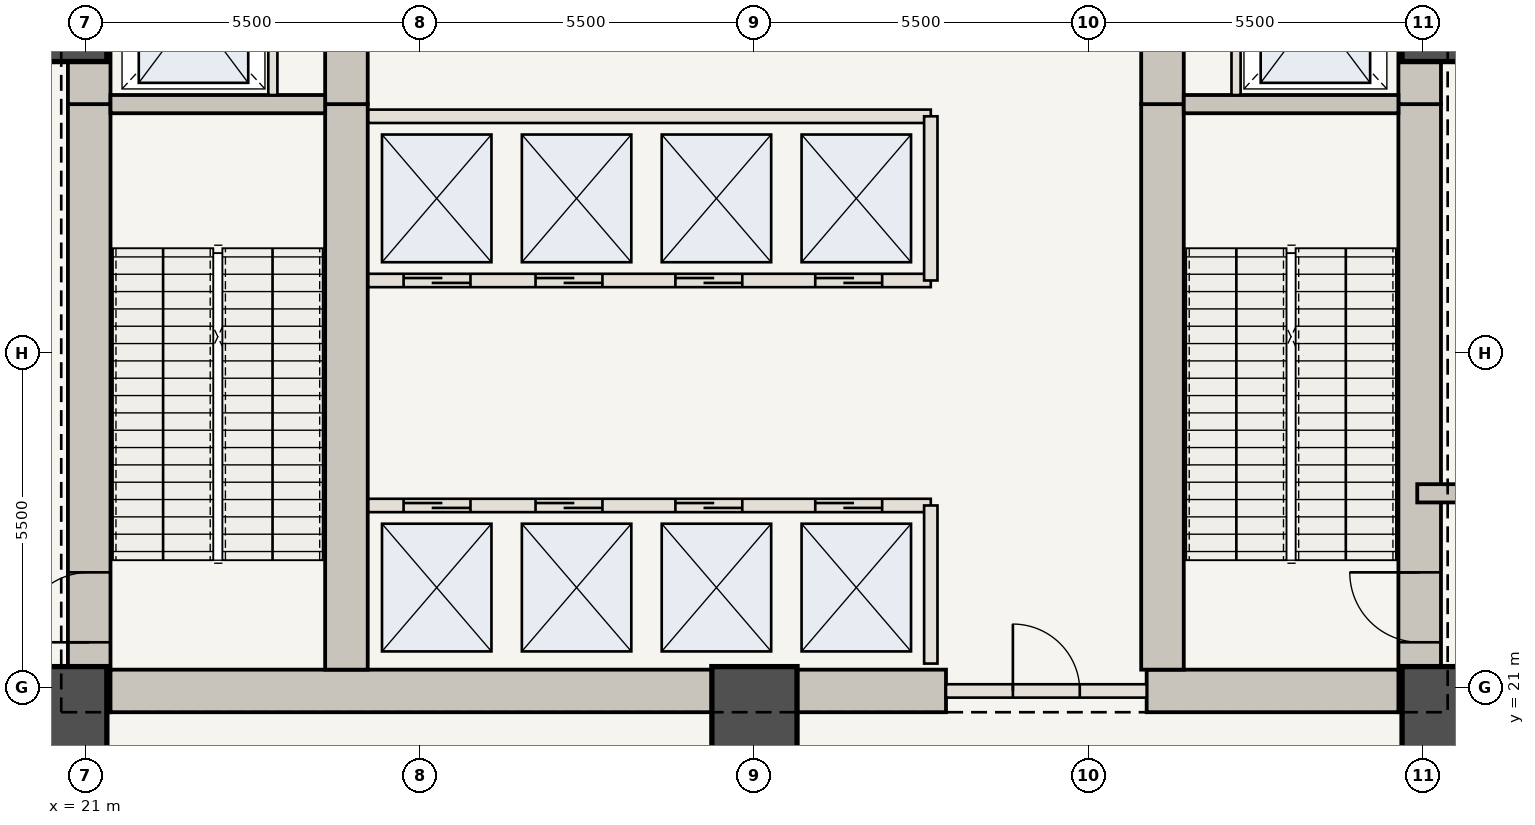
"""IFC4 building model, lengths in metres.
Left out: names, types, materials, properties, quantities, classifications, styles, units other than length and angle.
Written with IfcOpenShell. Run it as: python <this file> out.ifc"""

import sys

from ifc_helpers import new_model, si_unit, direction, frame, frame_2d, origin, origin_2d, place, context, subcontext, project, spatial, rectangle, extrude, element, fill, save


model = new_model("IFC4")
c1 = context("Model", 3, precision=1e-05, world=origin(), true_north=direction((0.0, 1.0)))
c2 = subcontext(c1, "Body", "Model", "MODEL_VIEW")
j1 = project(units=[si_unit("LENGTHUNIT", "METRE"), si_unit("PLANEANGLEUNIT", "RADIAN")], contexts=[c1])
p1 = place(None, origin())
s1 = spatial("IfcSite", under=j1, at=p1, CompositionType="ELEMENT")
p2 = place(p1, origin())
s2 = spatial("IfcBuilding", under=s1, at=p2, CompositionType="ELEMENT")
p3 = place(p2, origin())
s3 = spatial("IfcBuildingStorey", under=s2, at=p3, CompositionType="ELEMENT", Elevation=0.0)
p4 = place(p3, frame((21.06, 20.6, 0.0), z_axis=(0.0, 0.0, 1.0), x_axis=(0.0, 1.0, 0.0)))
e1 = element("IfcWall", 1, at=p4, inside=s3, PredefinedType="SHEAR", context=c2, shape_type="SweptSolid", body=[
    extrude(rectangle(XDim=10.0, YDim=0.7, at=frame_2d((5.0, 0.0))), origin(), (0.0, 0.0, 1.0), 6.65),
])
p5 = place(p4, frame((1.15, 0.0, 0.0)))
e2 = element("IfcOpeningElement", 2, at=p5, cuts=e1, PredefinedType="OPENING", context=c2, shape_type="SweptSolid", body=[
    extrude(rectangle(XDim=1.15, YDim=2.15, at=frame_2d((0.575, 1.075))), frame((0.0, 0.36, 0.0), z_axis=(0.0, -1.0, 0.0), x_axis=(1.0, 0.0, 0.0)), (0.0, 0.0, 1.0), 0.72),
])
p6 = place(p3, frame((21.06, 30.6, 0.0), z_axis=(0.0, 0.0, 1.0), x_axis=(0.0, 1.0, 0.0)))
e3 = element("IfcWall", 3, at=p6, inside=s3, PredefinedType="SHEAR", context=c2, shape_type="SweptSolid", body=[
    extrude(rectangle(XDim=12.75, YDim=0.7, at=frame_2d((6.375, 0.0))), origin(), (0.0, 0.0, 1.0), 6.65),
])
p7 = place(p6, frame((4.2, 0.0, 0.0)))
e4 = element("IfcOpeningElement", 4, at=p7, cuts=e3, PredefinedType="OPENING", context=c2, shape_type="SweptSolid", body=[
    extrude(rectangle(XDim=1.1, YDim=2.15, at=frame_2d((0.55, 1.075))), frame((0.0, 0.36, 0.0), z_axis=(0.0, -1.0, 0.0), x_axis=(1.0, 0.0, 0.0)), (0.0, 0.0, 1.0), 0.72),
])
p8 = place(p6, frame((9.2, 0.0, 0.0)))
e5 = element("IfcOpeningElement", 5, at=p8, cuts=e3, PredefinedType="OPENING", context=c2, shape_type="SweptSolid", body=[
    extrude(rectangle(XDim=0.92, YDim=2.1, at=frame_2d((0.46, 1.05))), frame((0.0, 0.36, 0.0), z_axis=(0.0, -1.0, 0.0), x_axis=(1.0, 0.0, 0.0)), (0.0, 0.0, 1.0), 0.72),
])
p9 = place(p3, frame((42.94, 20.6, 0.0), z_axis=(0.0, 0.0, 1.0), x_axis=(0.0, 1.0, 0.0)))
e6 = element("IfcWall", 6, at=p9, inside=s3, PredefinedType="SHEAR", context=c2, shape_type="SweptSolid", body=[
    extrude(rectangle(XDim=10.0, YDim=0.7, at=frame_2d((5.0, 0.0))), origin(), (0.0, 0.0, 1.0), 6.65),
])
p10 = place(p9, frame((1.15, 0.0, 0.0)))
e7 = element("IfcOpeningElement", 7, at=p10, cuts=e6, PredefinedType="OPENING", context=c2, shape_type="SweptSolid", body=[
    extrude(rectangle(XDim=1.15, YDim=2.15, at=frame_2d((0.575, 1.075))), frame((0.0, 0.36, 0.0), z_axis=(0.0, -1.0, 0.0), x_axis=(1.0, 0.0, 0.0)), (0.0, 0.0, 1.0), 0.72),
])
p11 = place(p3, frame((42.94, 30.6, 0.0), z_axis=(0.0, 0.0, 1.0), x_axis=(0.0, 1.0, 0.0)))
e8 = element("IfcWall", 8, at=p11, inside=s3, PredefinedType="SHEAR", context=c2, shape_type="SweptSolid", body=[
    extrude(rectangle(XDim=12.75, YDim=0.7, at=frame_2d((6.375, 0.0))), origin(), (0.0, 0.0, 1.0), 6.65),
])
p12 = place(p11, frame((4.2, 0.0, 0.0)))
e9 = element("IfcOpeningElement", 9, at=p12, cuts=e8, PredefinedType="OPENING", context=c2, shape_type="SweptSolid", body=[
    extrude(rectangle(XDim=1.1, YDim=2.15, at=frame_2d((0.55, 1.075))), frame((0.0, 0.36, 0.0), z_axis=(0.0, -1.0, 0.0), x_axis=(1.0, 0.0, 0.0)), (0.0, 0.0, 1.0), 0.72),
])
p13 = place(p11, frame((8.4, 0.0, 0.0)))
e10 = element("IfcOpeningElement", 10, at=p13, cuts=e8, PredefinedType="OPENING", context=c2, shape_type="SweptSolid", body=[
    extrude(rectangle(XDim=0.88, YDim=2.1, at=frame_2d((0.44, 1.05))), frame((0.0, 0.36, 0.0), z_axis=(0.0, -1.0, 0.0), x_axis=(1.0, 0.0, 0.0)), (0.0, 0.0, 1.0), 0.72),
])
p14 = place(p11, frame((10.5, 0.0, 0.0)))
e11 = element("IfcOpeningElement", 11, at=p14, cuts=e8, PredefinedType="OPENING", context=c2, shape_type="SweptSolid", body=[
    extrude(rectangle(XDim=0.88, YDim=2.1, at=frame_2d((0.44, 1.05))), frame((0.0, 0.36, 0.0), z_axis=(0.0, -1.0, 0.0), x_axis=(1.0, 0.0, 0.0)), (0.0, 0.0, 1.0), 0.72),
])
p15 = place(p3, frame((21.41, 20.95, 0.0), z_axis=(0.0, 0.0, 1.0), x_axis=(1.0, 0.0, 0.0)))
e12 = element("IfcWall", 12, at=p15, inside=s3, PredefinedType="SHEAR", context=c2, shape_type="SweptSolid", body=[
    extrude(rectangle(XDim=13.74, YDim=0.7, at=frame_2d((6.87, 0.0))), origin(), (0.0, 0.0, 1.0), 6.65),
])
p16 = place(p3, frame((38.45, 20.95, 0.0), z_axis=(0.0, 0.0, 1.0), x_axis=(1.0, 0.0, 0.0)))
e13 = element("IfcWall", 13, at=p16, inside=s3, PredefinedType="SHEAR", context=c2, shape_type="SweptSolid", body=[
    extrude(rectangle(XDim=4.14, YDim=0.7, at=frame_2d((2.07, 0.0))), origin(), (0.0, 0.0, 1.0), 6.65),
])
p17 = place(p3, frame((25.29, 21.3, 0.0), z_axis=(0.0, 0.0, 1.0), x_axis=(0.0, 1.0, 0.0)))
e14 = element("IfcWall", 14, at=p17, inside=s3, PredefinedType="SHEAR", context=c2, shape_type="SweptSolid", body=[
    extrude(rectangle(XDim=9.3, YDim=0.7, at=frame_2d((4.65, 0.0))), origin(), (0.0, 0.0, 1.0), 6.65),
])
p18 = place(p3, frame((25.29, 30.6, 0.0), z_axis=(0.0, 0.0, 1.0), x_axis=(0.0, 1.0, 0.0)))
e15 = element("IfcWall", 15, at=p18, inside=s3, PredefinedType="SHEAR", context=c2, shape_type="SweptSolid", body=[
    extrude(rectangle(XDim=12.05, YDim=0.7, at=frame_2d((6.025, 0.0))), origin(), (0.0, 0.0, 1.0), 6.65),
])
p19 = place(p18, frame((6.25, 0.0, 0.0)))
e16 = element("IfcOpeningElement", 16, at=p19, cuts=e15, PredefinedType="OPENING", context=c2, shape_type="SweptSolid", body=[
    extrude(rectangle(XDim=1.1, YDim=2.15, at=frame_2d((0.55, 1.075))), frame((0.0, 0.36, 0.0), z_axis=(0.0, -1.0, 0.0), x_axis=(1.0, 0.0, 0.0)), (0.0, 0.0, 1.0), 0.72),
])
p20 = place(p3, frame((38.71, 21.3, 0.0), z_axis=(0.0, 0.0, 1.0), x_axis=(0.0, 1.0, 0.0)))
e17 = element("IfcWall", 17, at=p20, inside=s3, PredefinedType="SHEAR", context=c2, shape_type="SweptSolid", body=[
    extrude(rectangle(XDim=9.3, YDim=0.7, at=frame_2d((4.65, 0.0))), origin(), (0.0, 0.0, 1.0), 6.65),
])
p21 = place(p3, frame((38.71, 30.6, 0.0), z_axis=(0.0, 0.0, 1.0), x_axis=(0.0, 1.0, 0.0)))
e18 = element("IfcWall", 18, at=p21, inside=s3, PredefinedType="SHEAR", context=c2, shape_type="SweptSolid", body=[
    extrude(rectangle(XDim=12.05, YDim=0.7, at=frame_2d((6.025, 0.0))), origin(), (0.0, 0.0, 1.0), 6.65),
])
for number, where, z_axis, x_axis in (
    (19, (20.65, 20.65, 0.0), (0.0, 0.0, 1.0), (1.0, 0.0, 0.0)),
    (20, (32.0, 20.65, 0.0), (0.0, 0.0, 1.0), (1.0, 0.0, 0.0)),
    (21, (43.35, 20.65, 0.0), (0.0, 0.0, 1.0), (1.0, 0.0, 0.0)),
    (22, (43.35, 32.0, 0.0), (0.0, 0.0, 1.0), (1.0, 0.0, 0.0)),
    (23, (20.65, 32.0, 0.0), (0.0, 0.0, 1.0), (1.0, 0.0, 0.0)),
):
    element("IfcColumn", number, at=place(p3, frame(where, z_axis=z_axis, x_axis=x_axis)), inside=s3, PredefinedType="COLUMN", context=c2, shape_type="SweptSolid", body=[
        extrude(rectangle(XDim=1.4, YDim=1.4, at=origin_2d()), origin(), (0.0, 0.0, 1.0), 6.65),
    ])
for number, where, z_axis, x_axis in (
    (24, (21.41, 30.6, 0.0), (0.0, 0.0, 1.0), (1.0, 0.0, 0.0)),
    (25, (39.06, 30.6, 0.0), (0.0, 0.0, 1.0), (1.0, 0.0, 0.0)),
):
    element("IfcWall", number, at=place(p3, frame(where, z_axis=z_axis, x_axis=x_axis)), inside=s3, PredefinedType="SHEAR", context=c2, shape_type="SweptSolid", body=[
        extrude(rectangle(XDim=3.53, YDim=0.3, at=frame_2d((1.765, 0.0))), origin(), (0.0, 0.0, 1.0), 6.41),
    ])
for number, where, z_axis, x_axis in (
    (26, (24.08, 30.75, 0.0), (0.0, 0.0, 1.0), (0.0, 1.0, 0.0)),
    (27, (39.92, 30.75, 0.0), (0.0, 0.0, 1.0), (0.0, 1.0, 0.0)),
):
    element("IfcWall", number, at=place(p3, frame(where, z_axis=z_axis, x_axis=x_axis)), inside=s3, PredefinedType="STANDARD", context=c2, shape_type="SweptSolid", body=[
        extrude(rectangle(XDim=2.65, YDim=0.15, at=frame_2d((1.325, 0.0))), origin(), (0.0, 0.0, 1.0), 6.41),
    ])
p22 = place(p3, frame((35.15, 20.95, 0.0), z_axis=(0.0, 0.0, 1.0), x_axis=(1.0, 0.0, 0.0)))
e28 = element("IfcWall", 28, at=p22, inside=s3, PredefinedType="STANDARD", context=c2, shape_type="SweptSolid", body=[
    extrude(rectangle(XDim=3.3, YDim=0.22, at=frame_2d((1.65, 0.0))), origin(), (0.0, 0.0, 1.0), 6.41),
])
p23 = place(p22, frame((1.1, 0.0, 0.0)))
e29 = element("IfcOpeningElement", 29, at=p23, cuts=e28, PredefinedType="OPENING", context=c2, shape_type="SweptSolid", body=[
    extrude(rectangle(XDim=1.1, YDim=2.15, at=frame_2d((0.55, 1.075))), frame((0.0, 0.12, 0.0), z_axis=(0.0, -1.0, 0.0), x_axis=(1.0, 0.0, 0.0)), (0.0, 0.0, 1.0), 0.24),
])
p24 = place(p3, frame((25.65, 24.0, 0.0), z_axis=(0.0, 0.0, 1.0), x_axis=(1.0, 0.0, 0.0)))
e30 = element("IfcWall", 30, at=p24, inside=s3, PredefinedType="STANDARD", context=c2, shape_type="SweptSolid", body=[
    extrude(rectangle(XDim=9.25, YDim=0.22, at=frame_2d((4.625, 0.0))), origin(), (0.0, 0.0, 1.0), 6.41),
])
p25 = place(p24, frame((0.58, 0.0, 0.0)))
e31 = element("IfcOpeningElement", 31, at=p25, cuts=e30, PredefinedType="OPENING", context=c2, shape_type="SweptSolid", body=[
    extrude(rectangle(XDim=1.1, YDim=2.15, at=frame_2d((0.55, 1.075))), frame((0.0, 0.12, 0.0), z_axis=(0.0, -1.0, 0.0), x_axis=(1.0, 0.0, 0.0)), (0.0, 0.0, 1.0), 0.24),
])
p26 = place(p24, frame((2.75, 0.0, 0.0)))
e32 = element("IfcOpeningElement", 32, at=p26, cuts=e30, PredefinedType="OPENING", context=c2, shape_type="SweptSolid", body=[
    extrude(rectangle(XDim=1.1, YDim=2.15, at=frame_2d((0.55, 1.075))), frame((0.0, 0.12, 0.0), z_axis=(0.0, -1.0, 0.0), x_axis=(1.0, 0.0, 0.0)), (0.0, 0.0, 1.0), 0.24),
])
p27 = place(p24, frame((5.05, 0.0, 0.0)))
e33 = element("IfcOpeningElement", 33, at=p27, cuts=e30, PredefinedType="OPENING", context=c2, shape_type="SweptSolid", body=[
    extrude(rectangle(XDim=1.1, YDim=2.15, at=frame_2d((0.55, 1.075))), frame((0.0, 0.12, 0.0), z_axis=(0.0, -1.0, 0.0), x_axis=(1.0, 0.0, 0.0)), (0.0, 0.0, 1.0), 0.24),
])
p28 = place(p24, frame((7.35, 0.0, 0.0)))
e34 = element("IfcOpeningElement", 34, at=p28, cuts=e30, PredefinedType="OPENING", context=c2, shape_type="SweptSolid", body=[
    extrude(rectangle(XDim=1.1, YDim=2.15, at=frame_2d((0.55, 1.075))), frame((0.0, 0.12, 0.0), z_axis=(0.0, -1.0, 0.0), x_axis=(1.0, 0.0, 0.0)), (0.0, 0.0, 1.0), 0.24),
])
p29 = place(p3, frame((34.9, 21.4, 0.0), z_axis=(0.0, 0.0, 1.0), x_axis=(0.0, 1.0, 0.0)))
e35 = element("IfcWall", 35, at=p29, inside=s3, PredefinedType="STANDARD", context=c2, shape_type="SweptSolid", body=[
    extrude(rectangle(XDim=2.6, YDim=0.22, at=frame_2d((1.3, 0.0))), origin(), (0.0, 0.0, 1.0), 6.41),
])
p30 = place(p3, frame((25.65, 27.7, 0.0), z_axis=(0.0, 0.0, 1.0), x_axis=(1.0, 0.0, 0.0)))
e36 = element("IfcWall", 36, at=p30, inside=s3, PredefinedType="STANDARD", context=c2, shape_type="SweptSolid", body=[
    extrude(rectangle(XDim=9.25, YDim=0.22, at=frame_2d((4.625, 0.0))), origin(), (0.0, 0.0, 1.0), 6.41),
])
p31 = place(p30, frame((0.58, 0.0, 0.0)))
e37 = element("IfcOpeningElement", 37, at=p31, cuts=e36, PredefinedType="OPENING", context=c2, shape_type="SweptSolid", body=[
    extrude(rectangle(XDim=1.1, YDim=2.15, at=frame_2d((0.55, 1.075))), frame((0.0, 0.12, 0.0), z_axis=(0.0, -1.0, 0.0), x_axis=(1.0, 0.0, 0.0)), (0.0, 0.0, 1.0), 0.24),
])
p32 = place(p30, frame((2.75, 0.0, 0.0)))
e38 = element("IfcOpeningElement", 38, at=p32, cuts=e36, PredefinedType="OPENING", context=c2, shape_type="SweptSolid", body=[
    extrude(rectangle(XDim=1.1, YDim=2.15, at=frame_2d((0.55, 1.075))), frame((0.0, 0.12, 0.0), z_axis=(0.0, -1.0, 0.0), x_axis=(1.0, 0.0, 0.0)), (0.0, 0.0, 1.0), 0.24),
])
p33 = place(p30, frame((5.05, 0.0, 0.0)))
e39 = element("IfcOpeningElement", 39, at=p33, cuts=e36, PredefinedType="OPENING", context=c2, shape_type="SweptSolid", body=[
    extrude(rectangle(XDim=1.1, YDim=2.15, at=frame_2d((0.55, 1.075))), frame((0.0, 0.12, 0.0), z_axis=(0.0, -1.0, 0.0), x_axis=(1.0, 0.0, 0.0)), (0.0, 0.0, 1.0), 0.24),
])
p34 = place(p30, frame((7.35, 0.0, 0.0)))
e40 = element("IfcOpeningElement", 40, at=p34, cuts=e36, PredefinedType="OPENING", context=c2, shape_type="SweptSolid", body=[
    extrude(rectangle(XDim=1.1, YDim=2.15, at=frame_2d((0.55, 1.075))), frame((0.0, 0.12, 0.0), z_axis=(0.0, -1.0, 0.0), x_axis=(1.0, 0.0, 0.0)), (0.0, 0.0, 1.0), 0.24),
])
p35 = place(p3, frame((25.65, 30.4, 0.0), z_axis=(0.0, 0.0, 1.0), x_axis=(1.0, 0.0, 0.0)))
e41 = element("IfcWall", 41, at=p35, inside=s3, PredefinedType="STANDARD", context=c2, shape_type="SweptSolid", body=[
    extrude(rectangle(XDim=9.25, YDim=0.22, at=frame_2d((4.625, 0.0))), origin(), (0.0, 0.0, 1.0), 6.41),
])
p36 = place(p3, frame((34.9, 27.7, 0.0), z_axis=(0.0, 0.0, 1.0), x_axis=(0.0, 1.0, 0.0)))
e42 = element("IfcWall", 42, at=p36, inside=s3, PredefinedType="STANDARD", context=c2, shape_type="SweptSolid", body=[
    extrude(rectangle(XDim=2.7, YDim=0.22, at=frame_2d((1.35, 0.0))), origin(), (0.0, 0.0, 1.0), 6.41),
])
for number, where, z_axis, x_axis in (
    (43, (42.9, 20.9, 0.0), (0.0, 0.0, 1.0), (1.0, 0.0, 0.0)),
    (44, (42.9, 24.2, 0.0), (0.0, 0.0, 1.0), (1.0, 0.0, 0.0)),
):
    element("IfcWall", number, at=place(p3, frame(where, z_axis=z_axis, x_axis=x_axis)), inside=s3, PredefinedType="SHEAR", context=c2, shape_type="SweptSolid", body=[
        extrude(rectangle(XDim=14.05, YDim=0.3, at=frame_2d((7.025, 0.0))), origin(), (0.0, 0.0, 1.0), 6.41),
    ])
p37 = place(p5, origin())
e45 = element("IfcDoor", 45, at=p37, inside=s3, OperationType="SINGLE_SWING_LEFT", PredefinedType="DOOR", context=c2, shape_type="SweptSolid", body=[
    extrude(rectangle(XDim=1.15, YDim=2.15, at=frame_2d((0.575, 1.075))), frame((0.0, 0.025, 0.0), z_axis=(0.0, -1.0, 0.0), x_axis=(1.0, 0.0, 0.0)), (0.0, 0.0, 1.0), 0.05),
])
fill(e2, e45)
p38 = place(p10, origin())
e46 = element("IfcDoor", 46, at=p38, inside=s3, OperationType="SINGLE_SWING_RIGHT", PredefinedType="DOOR", context=c2, shape_type="SweptSolid", body=[
    extrude(rectangle(XDim=1.15, YDim=2.15, at=frame_2d((0.575, 1.075))), frame((0.0, 0.025, 0.0), z_axis=(0.0, -1.0, 0.0), x_axis=(1.0, 0.0, 0.0)), (0.0, 0.0, 1.0), 0.05),
])
fill(e7, e46)
p39 = place(p23, origin())
e47 = element("IfcDoor", 47, at=p39, inside=s3, OperationType="SINGLE_SWING_LEFT", PredefinedType="DOOR", context=c2, shape_type="SweptSolid", body=[
    extrude(rectangle(XDim=1.1, YDim=2.15, at=frame_2d((0.55, 1.075))), frame((0.0, 0.025, 0.0), z_axis=(0.0, -1.0, 0.0), x_axis=(1.0, 0.0, 0.0)), (0.0, 0.0, 1.0), 0.05),
])
fill(e29, e47)
p40 = place(p25, origin())
e48 = element("IfcDoor", 48, at=p40, inside=s3, OperationType="DOUBLE_DOOR_SLIDING", PredefinedType="DOOR", context=c2, shape_type="SweptSolid", body=[
    extrude(rectangle(XDim=1.1, YDim=2.15, at=frame_2d((0.55, 1.075))), frame((0.0, 0.025, 0.0), z_axis=(0.0, -1.0, 0.0), x_axis=(1.0, 0.0, 0.0)), (0.0, 0.0, 1.0), 0.05),
])
fill(e31, e48)
p41 = place(p26, origin())
e49 = element("IfcDoor", 49, at=p41, inside=s3, OperationType="DOUBLE_DOOR_SLIDING", PredefinedType="DOOR", context=c2, shape_type="SweptSolid", body=[
    extrude(rectangle(XDim=1.1, YDim=2.15, at=frame_2d((0.55, 1.075))), frame((0.0, 0.025, 0.0), z_axis=(0.0, -1.0, 0.0), x_axis=(1.0, 0.0, 0.0)), (0.0, 0.0, 1.0), 0.05),
])
fill(e32, e49)
p42 = place(p27, origin())
e50 = element("IfcDoor", 50, at=p42, inside=s3, OperationType="DOUBLE_DOOR_SLIDING", PredefinedType="DOOR", context=c2, shape_type="SweptSolid", body=[
    extrude(rectangle(XDim=1.1, YDim=2.15, at=frame_2d((0.55, 1.075))), frame((0.0, 0.025, 0.0), z_axis=(0.0, -1.0, 0.0), x_axis=(1.0, 0.0, 0.0)), (0.0, 0.0, 1.0), 0.05),
])
fill(e33, e50)
p43 = place(p28, origin())
e51 = element("IfcDoor", 51, at=p43, inside=s3, OperationType="DOUBLE_DOOR_SLIDING", PredefinedType="DOOR", context=c2, shape_type="SweptSolid", body=[
    extrude(rectangle(XDim=1.1, YDim=2.15, at=frame_2d((0.55, 1.075))), frame((0.0, 0.025, 0.0), z_axis=(0.0, -1.0, 0.0), x_axis=(1.0, 0.0, 0.0)), (0.0, 0.0, 1.0), 0.05),
])
fill(e34, e51)
p44 = place(p31, origin())
e52 = element("IfcDoor", 52, at=p44, inside=s3, OperationType="DOUBLE_DOOR_SLIDING", PredefinedType="DOOR", context=c2, shape_type="SweptSolid", body=[
    extrude(rectangle(XDim=1.1, YDim=2.15, at=frame_2d((0.55, 1.075))), frame((0.0, 0.025, 0.0), z_axis=(0.0, -1.0, 0.0), x_axis=(1.0, 0.0, 0.0)), (0.0, 0.0, 1.0), 0.05),
])
fill(e37, e52)
p45 = place(p32, origin())
e53 = element("IfcDoor", 53, at=p45, inside=s3, OperationType="DOUBLE_DOOR_SLIDING", PredefinedType="DOOR", context=c2, shape_type="SweptSolid", body=[
    extrude(rectangle(XDim=1.1, YDim=2.15, at=frame_2d((0.55, 1.075))), frame((0.0, 0.025, 0.0), z_axis=(0.0, -1.0, 0.0), x_axis=(1.0, 0.0, 0.0)), (0.0, 0.0, 1.0), 0.05),
])
fill(e38, e53)
p46 = place(p33, origin())
e54 = element("IfcDoor", 54, at=p46, inside=s3, OperationType="DOUBLE_DOOR_SLIDING", PredefinedType="DOOR", context=c2, shape_type="SweptSolid", body=[
    extrude(rectangle(XDim=1.1, YDim=2.15, at=frame_2d((0.55, 1.075))), frame((0.0, 0.025, 0.0), z_axis=(0.0, -1.0, 0.0), x_axis=(1.0, 0.0, 0.0)), (0.0, 0.0, 1.0), 0.05),
])
fill(e39, e54)
p47 = place(p34, origin())
e55 = element("IfcDoor", 55, at=p47, inside=s3, OperationType="DOUBLE_DOOR_SLIDING", PredefinedType="DOOR", context=c2, shape_type="SweptSolid", body=[
    extrude(rectangle(XDim=1.1, YDim=2.15, at=frame_2d((0.55, 1.075))), frame((0.0, 0.025, 0.0), z_axis=(0.0, -1.0, 0.0), x_axis=(1.0, 0.0, 0.0)), (0.0, 0.0, 1.0), 0.05),
])
fill(e40, e55)
save(model, sys.argv[1])
